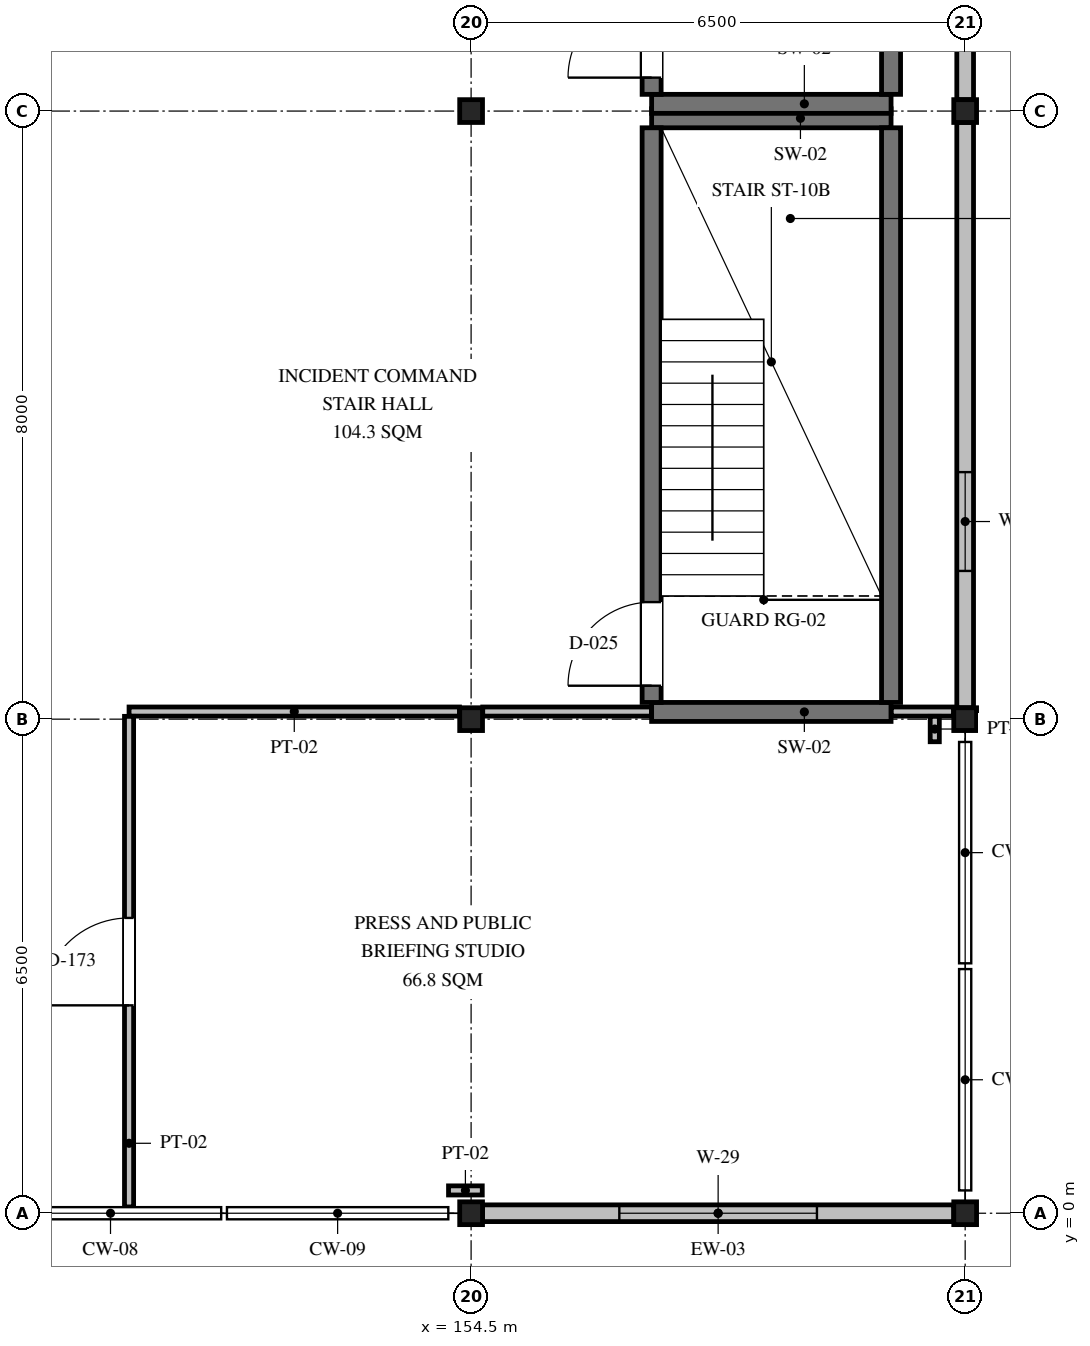
"""IFC4 building model, lengths in metres.
Left out: names, types, materials, properties, quantities, classifications, styles, units other than length and angle.
Written with IfcOpenShell. Run it as: python <this file> out.ifc"""

import sys

from ifc_helpers import new_model, si_unit, direction, frame, frame_2d, origin, origin_2d, place, context, subcontext, project, spatial, rectangle, i_section, extrude, element, fill, save


model = new_model("IFC4")
c1 = context("Model", 3, precision=1e-05, world=origin(), true_north=direction((0.0, 1.0)))
c2 = subcontext(c1, "Body", "Model", "MODEL_VIEW")
j1 = project(units=[si_unit("LENGTHUNIT", "METRE"), si_unit("PLANEANGLEUNIT", "RADIAN")], contexts=[c1])
p1 = place(None, origin())
s1 = spatial("IfcSite", under=j1, at=p1, CompositionType="ELEMENT")
p2 = place(p1, origin())
s2 = spatial("IfcBuilding", under=s1, at=p2, CompositionType="ELEMENT")
p3 = place(p2, frame((0.0, 0.0, 14.25)))
s3 = spatial("IfcBuildingStorey", under=s2, at=p3, CompositionType="ELEMENT", Elevation=14.25)
for number, where, z_axis, x_axis in (
    (1, (154.5, 0.0, 0.0), (0.0, 0.0, 1.0), (1.0, 0.0, 0.0)),
    (2, (154.5, 6.5, 0.0), (0.0, 0.0, 1.0), (1.0, 0.0, 0.0)),
    (3, (154.5, 14.5, 0.0), (0.0, 0.0, 1.0), (1.0, 0.0, 0.0)),
    (4, (161.0, 0.0, 0.0), (0.0, 0.0, 1.0), (1.0, 0.0, 0.0)),
    (5, (161.0, 6.5, 0.0), (0.0, 0.0, 1.0), (1.0, 0.0, 0.0)),
    (6, (161.0, 14.5, 0.0), (0.0, 0.0, 1.0), (1.0, 0.0, 0.0)),
):
    element("IfcColumn", number, at=place(p3, frame(where, z_axis=z_axis, x_axis=x_axis)), inside=s3, PredefinedType="COLUMN", context=c2, shape_type="SweptSolid", body=[
        extrude(i_section(OverallWidth=0.3, OverallDepth=0.3, WebThickness=0.01, FlangeThickness=0.015, FilletRadius=0.018, at=origin_2d()), origin(), (0.0, 0.0, 1.0), 4.2),
    ])
p4 = place(p3, frame((154.65, 0.0, 0.0), z_axis=(0.0, 0.0, 1.0), x_axis=(1.0, 0.0, 0.0)))
e7 = element("IfcWall", 7, at=p4, inside=s3, PredefinedType="SOLIDWALL", context=c2, shape_type="SweptSolid", body=[
    extrude(rectangle(XDim=6.2, YDim=0.22, at=frame_2d((3.1, 0.0))), origin(), (0.0, 0.0, 1.0), 3.474),
])
p5 = place(p4, frame((1.8, 0.0, 1.0)))
e8 = element("IfcOpeningElement", 8, at=p5, cuts=e7, PredefinedType="OPENING", context=c2, shape_type="SweptSolid", body=[
    extrude(rectangle(XDim=2.6, YDim=1.8, at=frame_2d((1.3, 0.9))), frame((0.0, 0.12, 0.0), z_axis=(0.0, -1.0, 0.0), x_axis=(1.0, 0.0, 0.0)), (0.0, 0.0, 1.0), 0.24),
])
p6 = place(p3, frame((161.0, 6.65, 0.0), z_axis=(0.0, 0.0, 1.0), x_axis=(0.0, 1.0, 0.0)))
e9 = element("IfcWall", 9, at=p6, inside=s3, PredefinedType="SOLIDWALL", context=c2, shape_type="SweptSolid", body=[
    extrude(rectangle(XDim=7.7, YDim=0.22, at=frame_2d((3.85, 0.0))), origin(), (0.0, 0.0, 1.0), 3.674),
])
p7 = place(p6, frame((1.8, 0.0, 1.05)))
e10 = element("IfcOpeningElement", 10, at=p7, cuts=e9, PredefinedType="OPENING", context=c2, shape_type="SweptSolid", body=[
    extrude(rectangle(XDim=1.3, YDim=2.0, at=frame_2d((0.65, 1.0))), frame((0.0, 0.12, 0.0), z_axis=(0.0, -1.0, 0.0), x_axis=(1.0, 0.0, 0.0)), (0.0, 0.0, 1.0), 0.24),
])
p8 = place(p3, frame((161.0, 14.65, 0.0), z_axis=(0.0, 0.0, 1.0), x_axis=(0.0, 1.0, 0.0)))
e11 = element("IfcWall", 11, at=p8, inside=s3, PredefinedType="SOLIDWALL", context=c2, shape_type="SweptSolid", body=[
    extrude(rectangle(XDim=7.7, YDim=0.22, at=frame_2d((3.85, 0.0))), origin(), (0.0, 0.0, 1.0), 3.634),
])
p9 = place(p8, frame((1.8, 0.0, 1.05)))
e12 = element("IfcOpeningElement", 12, at=p9, cuts=e11, PredefinedType="OPENING", context=c2, shape_type="SweptSolid", body=[
    extrude(rectangle(XDim=1.5, YDim=2.1, at=frame_2d((0.75, 1.05))), frame((0.0, 0.12, 0.0), z_axis=(0.0, -1.0, 0.0), x_axis=(1.0, 0.0, 0.0)), (0.0, 0.0, 1.0), 0.24),
])
for number, where, z_axis, x_axis in (
    (13, (156.875, 6.595, 0.0), (0.0, 0.0, 1.0), (1.0, 0.0, 0.0)),
    (14, (156.875, 14.405, 0.0), (0.0, 0.0, 1.0), (1.0, 0.0, 0.0)),
):
    element("IfcWall", number, at=place(p3, frame(where, z_axis=z_axis, x_axis=x_axis)), inside=s3, PredefinedType="SHEAR", context=c2, shape_type="SweptSolid", body=[
        extrude(rectangle(XDim=3.15, YDim=0.25, at=frame_2d((1.575, 0.0))), origin(), (0.0, 0.0, 1.0), 3.98),
    ])
p10 = place(p3, frame((156.875, 6.72, 0.0), z_axis=(0.0, 0.0, 1.0), x_axis=(0.0, 1.0, 0.0)))
e15 = element("IfcWall", 15, at=p10, inside=s3, PredefinedType="SHEAR", context=c2, shape_type="SweptSolid", body=[
    extrude(rectangle(XDim=7.56, YDim=0.25, at=frame_2d((3.78, 0.0))), origin(), (0.0, 0.0, 1.0), 3.98),
])
p11 = place(p10, frame((0.22, 0.0, 0.0)))
e16 = element("IfcOpeningElement", 16, at=p11, cuts=e15, PredefinedType="OPENING", context=c2, shape_type="SweptSolid", body=[
    extrude(rectangle(XDim=1.1, YDim=2.15, at=frame_2d((0.55, 1.075))), frame((0.0, 0.135, 0.0), z_axis=(0.0, -1.0, 0.0), x_axis=(1.0, 0.0, 0.0)), (0.0, 0.0, 1.0), 0.27),
])
p12 = place(p3, frame((160.025, 6.72, 0.0), z_axis=(0.0, 0.0, 1.0), x_axis=(0.0, 1.0, 0.0)))
e17 = element("IfcWall", 17, at=p12, inside=s3, PredefinedType="SHEAR", context=c2, shape_type="SweptSolid", body=[
    extrude(rectangle(XDim=7.56, YDim=0.25, at=frame_2d((3.78, 0.0))), origin(), (0.0, 0.0, 1.0), 3.98),
])
p13 = place(p3, frame((156.875, 14.595, 0.0), z_axis=(0.0, 0.0, 1.0), x_axis=(1.0, 0.0, 0.0)))
e18 = element("IfcWall", 18, at=p13, inside=s3, PredefinedType="SHEAR", context=c2, shape_type="SweptSolid", body=[
    extrude(rectangle(XDim=3.15, YDim=0.25, at=frame_2d((1.575, 0.0))), origin(), (0.0, 0.0, 1.0), 3.98),
])
p14 = place(p3, frame((156.875, 14.72, 0.0), z_axis=(0.0, 0.0, 1.0), x_axis=(0.0, 1.0, 0.0)))
e19 = element("IfcWall", 19, at=p14, inside=s3, PredefinedType="SHEAR", context=c2, shape_type="SweptSolid", body=[
    extrude(rectangle(XDim=7.56, YDim=0.25, at=frame_2d((3.78, 0.0))), origin(), (0.0, 0.0, 1.0), 3.98),
])
p15 = place(p14, frame((0.22, 0.0, 0.0)))
e20 = element("IfcOpeningElement", 20, at=p15, cuts=e19, PredefinedType="OPENING", context=c2, shape_type="SweptSolid", body=[
    extrude(rectangle(XDim=1.1, YDim=2.15, at=frame_2d((0.55, 1.075))), frame((0.0, 0.135, 0.0), z_axis=(0.0, -1.0, 0.0), x_axis=(1.0, 0.0, 0.0)), (0.0, 0.0, 1.0), 0.27),
])
p16 = place(p3, frame((160.025, 14.72, 0.0), z_axis=(0.0, 0.0, 1.0), x_axis=(0.0, 1.0, 0.0)))
e21 = element("IfcWall", 21, at=p16, inside=s3, PredefinedType="SHEAR", context=c2, shape_type="SweptSolid", body=[
    extrude(rectangle(XDim=7.56, YDim=0.25, at=frame_2d((3.78, 0.0))), origin(), (0.0, 0.0, 1.0), 3.98),
])
p17 = place(p3, frame((154.203, 0.3, 0.0), z_axis=(0.0, 0.0, 1.0), x_axis=(1.0, 0.0, 0.0)))
e22 = element("IfcWall", 22, at=p17, inside=s3, PredefinedType="PARTITIONING", context=c2, shape_type="SweptSolid", body=[
    extrude(rectangle(XDim=0.444, YDim=0.12, at=frame_2d((0.222, 0.0))), origin(), (0.0, 0.0, 1.0), 3.98),
])
p18 = place(p3, frame((150.0, 6.6, 0.0), z_axis=(0.0, 0.0, 1.0), x_axis=(1.0, 0.0, 0.0)))
e23 = element("IfcWall", 23, at=p18, inside=s3, PredefinedType="PARTITIONING", context=c2, shape_type="SweptSolid", body=[
    extrude(rectangle(XDim=4.347, YDim=0.12, at=frame_2d((2.173, 0.0))), origin(), (0.0, 0.0, 1.0), 3.474),
])
p19 = place(p3, frame((154.653, 6.6, 0.0), z_axis=(0.0, 0.0, 1.0), x_axis=(1.0, 0.0, 0.0)))
e24 = element("IfcWall", 24, at=p19, inside=s3, PredefinedType="PARTITIONING", context=c2, shape_type="SweptSolid", body=[
    extrude(rectangle(XDim=2.219, YDim=0.12, at=frame_2d((1.109, 0.0))), origin(), (0.0, 0.0, 1.0), 3.98),
])
p20 = place(p3, frame((160.028, 6.6, 0.0), z_axis=(0.0, 0.0, 1.0), x_axis=(1.0, 0.0, 0.0)))
e25 = element("IfcWall", 25, at=p20, inside=s3, PredefinedType="PARTITIONING", context=c2, shape_type="SweptSolid", body=[
    extrude(rectangle(XDim=0.819, YDim=0.12, at=frame_2d((0.409, 0.0))), origin(), (0.0, 0.0, 1.0), 3.98),
])
p21 = place(p3, frame((150.0, 0.083, 0.0), z_axis=(0.0, 0.0, 1.0), x_axis=(0.0, 1.0, 0.0)))
e26 = element("IfcWall", 26, at=p21, inside=s3, PredefinedType="PARTITIONING", context=c2, shape_type="SweptSolid", body=[
    extrude(rectangle(XDim=6.454, YDim=0.12, at=frame_2d((3.227, 0.0))), origin(), (0.0, 0.0, 1.0), 3.574),
])
p22 = place(p21, frame((2.652, 0.0, 0.0)))
e27 = element("IfcOpeningElement", 27, at=p22, cuts=e26, PredefinedType="OPENING", context=c2, shape_type="SweptSolid", body=[
    extrude(rectangle(XDim=1.15, YDim=2.1, at=frame_2d((0.575, 1.05))), frame((0.0, 0.07, 0.0), z_axis=(0.0, -1.0, 0.0), x_axis=(1.0, 0.0, 0.0)), (0.0, 0.0, 1.0), 0.14),
])
p23 = place(p3, frame((160.6, 6.203, 0.0), z_axis=(0.0, 0.0, 1.0), x_axis=(0.0, 1.0, 0.0)))
e28 = element("IfcWall", 28, at=p23, inside=s3, PredefinedType="PARTITIONING", context=c2, shape_type="SweptSolid", body=[
    extrude(rectangle(XDim=0.334, YDim=0.12, at=frame_2d((0.167, 0.0))), origin(), (0.0, 0.0, 1.0), 3.98),
])
p24 = place(p5, origin())
e29 = element("IfcWindow", 29, at=p24, inside=s3, PartitioningType="SINGLE_PANEL", PredefinedType="WINDOW", context=c2, shape_type="SweptSolid", body=[
    extrude(rectangle(XDim=2.6, YDim=1.8, at=frame_2d((1.3, 0.9))), frame((0.0, 0.03, 0.0), z_axis=(0.0, -1.0, 0.0), x_axis=(1.0, 0.0, 0.0)), (0.0, 0.0, 1.0), 0.06),
])
fill(e8, e29)
p25 = place(p7, origin())
e30 = element("IfcWindow", 30, at=p25, inside=s3, PartitioningType="SINGLE_PANEL", PredefinedType="WINDOW", context=c2, shape_type="SweptSolid", body=[
    extrude(rectangle(XDim=1.3, YDim=2.0, at=frame_2d((0.65, 1.0))), frame((0.0, 0.03, 0.0), z_axis=(0.0, -1.0, 0.0), x_axis=(1.0, 0.0, 0.0)), (0.0, 0.0, 1.0), 0.06),
])
fill(e10, e30)
p26 = place(p11, origin())
e31 = element("IfcDoor", 31, at=p26, inside=s3, OperationType="SINGLE_SWING_LEFT", PredefinedType="DOOR", context=c2, shape_type="SweptSolid", body=[
    extrude(rectangle(XDim=1.1, YDim=2.15, at=frame_2d((0.55, 1.075))), frame((0.0, 0.025, 0.0), z_axis=(0.0, -1.0, 0.0), x_axis=(1.0, 0.0, 0.0)), (0.0, 0.0, 1.0), 0.05),
])
fill(e16, e31)
p27 = place(p15, origin())
e32 = element("IfcDoor", 32, at=p27, inside=s3, OperationType="SINGLE_SWING_LEFT", PredefinedType="DOOR", context=c2, shape_type="SweptSolid", body=[
    extrude(rectangle(XDim=1.1, YDim=2.15, at=frame_2d((0.55, 1.075))), frame((0.0, 0.025, 0.0), z_axis=(0.0, -1.0, 0.0), x_axis=(1.0, 0.0, 0.0)), (0.0, 0.0, 1.0), 0.05),
])
fill(e20, e32)
p28 = place(p22, origin())
e33 = element("IfcDoor", 33, at=p28, inside=s3, OperationType="SINGLE_SWING_LEFT", PredefinedType="DOOR", context=c2, shape_type="SweptSolid", body=[
    extrude(rectangle(XDim=1.15, YDim=2.1, at=frame_2d((0.575, 1.05))), frame((0.0, 0.025, 0.0), z_axis=(0.0, -1.0, 0.0), x_axis=(1.0, 0.0, 0.0)), (0.0, 0.0, 1.0), 0.05),
])
fill(e27, e33)
save(model, sys.argv[1])
